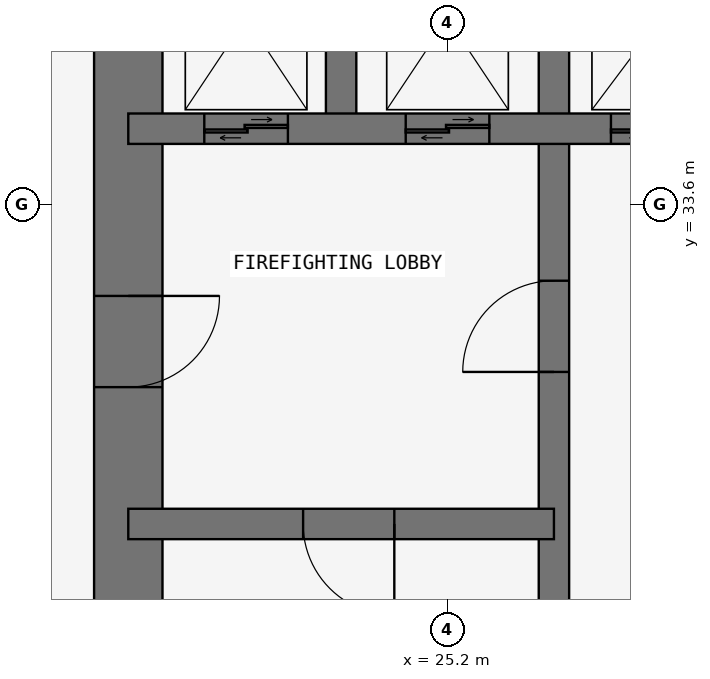
"""IFC4 building model, lengths in metres.
Left out: names, types, materials, properties, quantities, classifications, styles, units other than length and angle.
Written with IfcOpenShell. Run it as: python <this file> out.ifc"""

import sys

from ifc_helpers import new_model, si_unit, direction, frame, frame_2d, origin, place, context, subcontext, project, spatial, rectangle, extrude, element, fill, save


model = new_model("IFC4")
c1 = context("Model", 3, precision=1e-05, world=origin(), true_north=direction((0.0, 1.0)))
c2 = subcontext(c1, "Body", "Model", "MODEL_VIEW")
j1 = project(units=[si_unit("LENGTHUNIT", "METRE"), si_unit("PLANEANGLEUNIT", "RADIAN")], contexts=[c1])
p1 = place(None, origin())
s1 = spatial("IfcSite", under=j1, at=p1, CompositionType="ELEMENT")
p2 = place(p1, origin())
s2 = spatial("IfcBuilding", under=s1, at=p2, CompositionType="ELEMENT")
p3 = place(p2, frame((0.0, 0.0, 144.9)))
s3 = spatial("IfcBuildingStorey", under=s2, at=p3, CompositionType="ELEMENT", Elevation=144.9)
p4 = place(p3, frame((21.0, 37.8, 0.0), z_axis=(0.0, 0.0, 1.0), x_axis=(0.0, -1.0, 0.0)))
e1 = element("IfcWall", 1, at=p4, inside=s3, PredefinedType="SHEAR", context=c2, shape_type="SweptSolid", body=[
    extrude(rectangle(XDim=17.25, YDim=0.9, at=frame_2d((8.625, 0.0))), origin(), (0.0, 0.0, 1.0), 3.6),
])
p5 = place(p4, frame((5.4, 0.0, 0.0)))
e2 = element("IfcOpeningElement", 2, at=p5, cuts=e1, PredefinedType="OPENING", context=c2, shape_type="SweptSolid", body=[
    extrude(rectangle(XDim=1.2, YDim=2.1, at=frame_2d((0.6, 1.05))), frame((0.0, 0.46, 0.0), z_axis=(0.0, -1.0, 0.0), x_axis=(1.0, 0.0, 0.0)), (0.0, 0.0, 1.0), 0.92),
])
p6 = place(p3, frame((26.6, 21.0, 0.0), z_axis=(0.0, 0.0, 1.0), x_axis=(0.0, 1.0, 0.0)))
e3 = element("IfcWall", 3, at=p6, inside=s3, PredefinedType="SHEAR", context=c2, shape_type="SweptSolid", body=[
    extrude(rectangle(XDim=16.8, YDim=0.4, at=frame_2d((8.4, 0.0))), origin(), (0.0, 0.0, 1.0), 3.6),
])
p7 = place(p6, frame((10.4, 0.0, 0.0)))
e4 = element("IfcOpeningElement", 4, at=p7, cuts=e3, PredefinedType="OPENING", context=c2, shape_type="SweptSolid", body=[
    extrude(rectangle(XDim=1.2, YDim=2.1, at=frame_2d((0.6, 1.05))), frame((0.0, 0.21, 0.0), z_axis=(0.0, -1.0, 0.0), x_axis=(1.0, 0.0, 0.0)), (0.0, 0.0, 1.0), 0.42),
])
p8 = place(p3, frame((21.0, 29.4, 0.0), z_axis=(0.0, 0.0, 1.0), x_axis=(1.0, 0.0, 0.0)))
e5 = element("IfcWall", 5, at=p8, inside=s3, PredefinedType="SHEAR", context=c2, shape_type="SweptSolid", body=[
    extrude(rectangle(XDim=5.6, YDim=0.4, at=frame_2d((2.8, 0.0))), origin(), (0.0, 0.0, 1.0), 3.6),
])
p9 = place(p8, frame((2.3, 0.0, 0.0)))
e6 = element("IfcOpeningElement", 6, at=p9, cuts=e5, PredefinedType="OPENING", context=c2, shape_type="SweptSolid", body=[
    extrude(rectangle(XDim=1.2, YDim=2.1, at=frame_2d((0.6, 1.05))), frame((0.0, 0.21, 0.0), z_axis=(0.0, -1.0, 0.0), x_axis=(1.0, 0.0, 0.0)), (0.0, 0.0, 1.0), 0.42),
])
p10 = place(p3, frame((21.0, 34.6, 0.0), z_axis=(0.0, 0.0, 1.0), x_axis=(1.0, 0.0, 0.0)))
e7 = element("IfcWall", 7, at=p10, inside=s3, PredefinedType="SHEAR", context=c2, shape_type="SweptSolid", body=[
    extrude(rectangle(XDim=11.2, YDim=0.4, at=frame_2d((5.6, 0.0))), origin(), (0.0, 0.0, 1.0), 3.6),
])
p11 = place(p10, frame((9.35, 0.0, 0.0)))
e8 = element("IfcOpeningElement", 8, at=p11, cuts=e7, PredefinedType="OPENING", context=c2, shape_type="SweptSolid", body=[
    extrude(rectangle(XDim=0.9, YDim=2.1, at=frame_2d((0.45, 1.05))), frame((0.0, 0.21, 0.0), z_axis=(0.0, -1.0, 0.0), x_axis=(1.0, 0.0, 0.0)), (0.0, 0.0, 1.0), 0.42),
])
p12 = place(p10, frame((1.0, 0.0, 0.0)))
e9 = element("IfcOpeningElement", 9, at=p12, cuts=e7, PredefinedType="OPENING", context=c2, shape_type="SweptSolid", body=[
    extrude(rectangle(XDim=1.1, YDim=2.1, at=frame_2d((0.55, 1.05))), frame((0.0, 0.21, 0.0), z_axis=(0.0, -1.0, 0.0), x_axis=(1.0, 0.0, 0.0)), (0.0, 0.0, 1.0), 0.42),
])
p13 = place(p10, frame((3.65, 0.0, 0.0)))
e10 = element("IfcOpeningElement", 10, at=p13, cuts=e7, PredefinedType="OPENING", context=c2, shape_type="SweptSolid", body=[
    extrude(rectangle(XDim=1.1, YDim=2.1, at=frame_2d((0.55, 1.05))), frame((0.0, 0.21, 0.0), z_axis=(0.0, -1.0, 0.0), x_axis=(1.0, 0.0, 0.0)), (0.0, 0.0, 1.0), 0.42),
])
p14 = place(p10, frame((6.35, 0.0, 0.0)))
e11 = element("IfcOpeningElement", 11, at=p14, cuts=e7, PredefinedType="OPENING", context=c2, shape_type="SweptSolid", body=[
    extrude(rectangle(XDim=1.3, YDim=2.1, at=frame_2d((0.65, 1.05))), frame((0.0, 0.21, 0.0), z_axis=(0.0, -1.0, 0.0), x_axis=(1.0, 0.0, 0.0)), (0.0, 0.0, 1.0), 0.42),
])
p15 = place(p3, frame((23.8, 34.6, 0.0), z_axis=(0.0, 0.0, 1.0), x_axis=(0.0, 1.0, 0.0)))
e12 = element("IfcWall", 12, at=p15, inside=s3, PredefinedType="SHEAR", context=c2, shape_type="SweptSolid", body=[
    extrude(rectangle(XDim=3.2, YDim=0.4, at=frame_2d((1.6, 0.0))), origin(), (0.0, 0.0, 1.0), 3.6),
])
p16 = place(p5, origin())
e13 = element("IfcDoor", 13, at=p16, inside=s3, OperationType="SINGLE_SWING_LEFT", PredefinedType="DOOR", context=c2, shape_type="SweptSolid", body=[
    extrude(rectangle(XDim=1.2, YDim=2.1, at=frame_2d((0.6, 1.05))), frame((0.0, 0.025, 0.0), z_axis=(0.0, -1.0, 0.0), x_axis=(1.0, 0.0, 0.0)), (0.0, 0.0, 1.0), 0.05),
])
fill(e2, e13)
p17 = place(p9, frame((1.2, 0.0, 0.0), z_axis=(0.0, 0.0, 1.0), x_axis=(-1.0, 0.0, 0.0)))
e14 = element("IfcDoor", 14, at=p17, inside=s3, OperationType="SINGLE_SWING_LEFT", PredefinedType="DOOR", context=c2, shape_type="SweptSolid", body=[
    extrude(rectangle(XDim=1.2, YDim=2.1, at=frame_2d((0.6, 1.05))), frame((0.0, 0.025, 0.0), z_axis=(0.0, -1.0, 0.0), x_axis=(1.0, 0.0, 0.0)), (0.0, 0.0, 1.0), 0.05),
])
fill(e6, e14)
p18 = place(p7, origin())
e15 = element("IfcDoor", 15, at=p18, inside=s3, OperationType="SINGLE_SWING_LEFT", PredefinedType="DOOR", context=c2, shape_type="SweptSolid", body=[
    extrude(rectangle(XDim=1.2, YDim=2.1, at=frame_2d((0.6, 1.05))), frame((0.0, 0.025, 0.0), z_axis=(0.0, -1.0, 0.0), x_axis=(1.0, 0.0, 0.0)), (0.0, 0.0, 1.0), 0.05),
])
fill(e4, e15)
p19 = place(p12, origin())
e16 = element("IfcDoor", 16, at=p19, inside=s3, OperationType="DOUBLE_DOOR_SLIDING", PredefinedType="DOOR", context=c2, shape_type="SweptSolid", body=[
    extrude(rectangle(XDim=1.1, YDim=2.1, at=frame_2d((0.55, 1.05))), frame((0.0, 0.025, 0.0), z_axis=(0.0, -1.0, 0.0), x_axis=(1.0, 0.0, 0.0)), (0.0, 0.0, 1.0), 0.05),
])
fill(e9, e16)
p20 = place(p13, origin())
e17 = element("IfcDoor", 17, at=p20, inside=s3, OperationType="DOUBLE_DOOR_SLIDING", PredefinedType="DOOR", context=c2, shape_type="SweptSolid", body=[
    extrude(rectangle(XDim=1.1, YDim=2.1, at=frame_2d((0.55, 1.05))), frame((0.0, 0.025, 0.0), z_axis=(0.0, -1.0, 0.0), x_axis=(1.0, 0.0, 0.0)), (0.0, 0.0, 1.0), 0.05),
])
fill(e10, e17)
p21 = place(p14, origin())
e18 = element("IfcDoor", 18, at=p21, inside=s3, OperationType="DOUBLE_DOOR_SLIDING", PredefinedType="DOOR", context=c2, shape_type="SweptSolid", body=[
    extrude(rectangle(XDim=1.3, YDim=2.1, at=frame_2d((0.65, 1.05))), frame((0.0, 0.025, 0.0), z_axis=(0.0, -1.0, 0.0), x_axis=(1.0, 0.0, 0.0)), (0.0, 0.0, 1.0), 0.05),
])
fill(e11, e18)
save(model, sys.argv[1])
